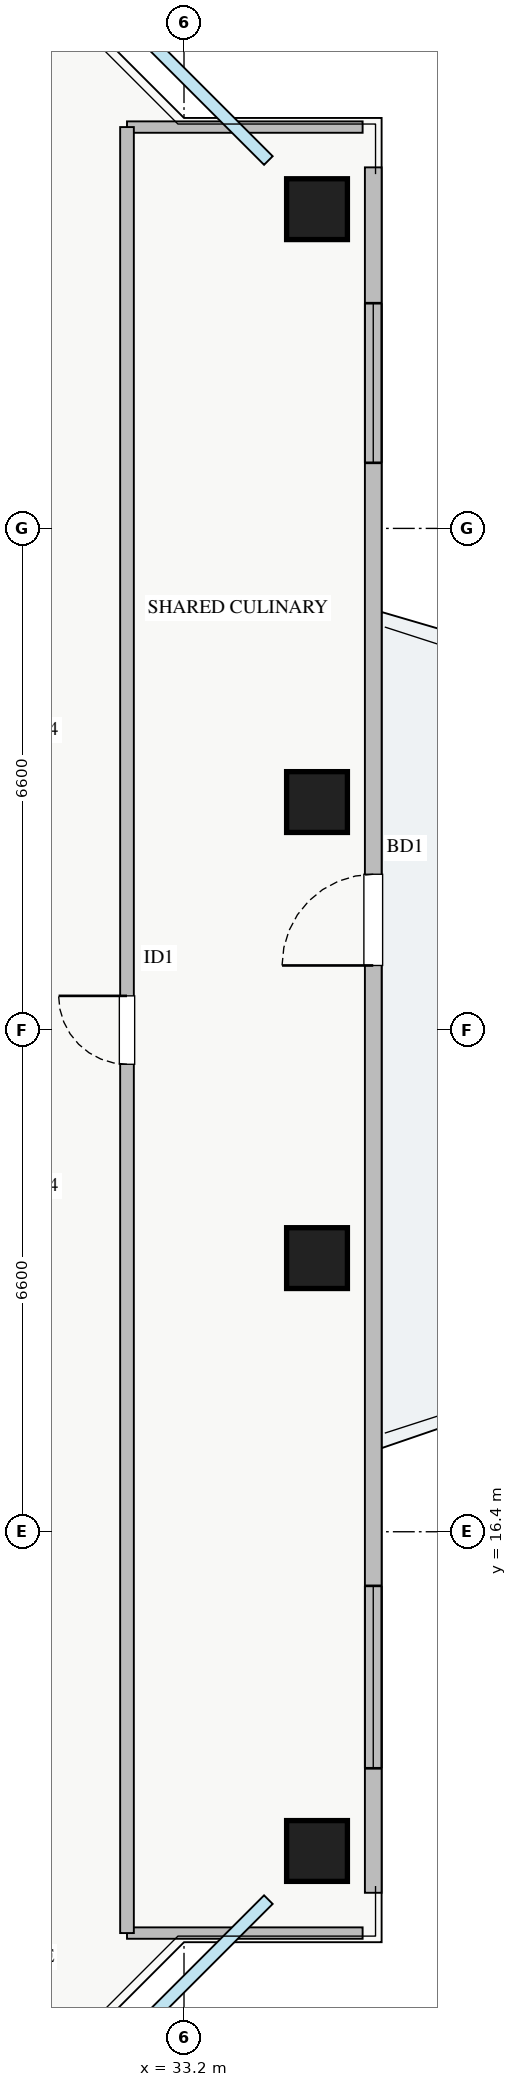
"""IFC4 building model, lengths in metres.
Left out: names, types, materials, properties, quantities, classifications, styles, units other than length and angle.
Written with IfcOpenShell. Run it as: python <this file> out.ifc"""

import sys

from ifc_helpers import new_model, si_unit, direction, frame, frame_2d, origin, origin_2d, place, context, subcontext, project, spatial, rectangle, extrude, source, transform, mapped, element, fill, save


model = new_model("IFC4")
c1 = context("Model", 3, precision=1e-05, world=origin(), true_north=direction((0.0, 1.0)))
c2 = subcontext(c1, "Body", "Model", "MODEL_VIEW")
j1 = project(units=[si_unit("LENGTHUNIT", "METRE"), si_unit("PLANEANGLEUNIT", "RADIAN")], contexts=[c1])
p1 = place(None, origin())
s1 = spatial("IfcSite", under=j1, at=p1, CompositionType="ELEMENT")
p2 = place(p1, origin())
s2 = spatial("IfcBuilding", under=s1, at=p2, CompositionType="ELEMENT")
p3 = place(p2, frame((0.0, 0.0, 229.5)))
s3 = spatial("IfcBuildingStorey", under=s2, at=p3, CompositionType="ELEMENT", Elevation=229.5)
m1 = source(origin(), c2, "Body", "SweptSolid", [
    extrude(rectangle(XDim=0.8, YDim=0.8, at=origin_2d()), origin(), (0.0, 0.0, 1.0), 3.25),
])
for number, where, z_axis, x_axis in (
    (1, (34.95, 12.2, 0.0), (0.0, 0.0, 1.0), (1.0, 0.0, 0.0)),
    (2, (34.95, 20.0, 0.0), (0.0, 0.0, 1.0), (1.0, 0.0, 0.0)),
    (3, (34.95, 26.0, 0.0), (0.0, 0.0, 1.0), (1.0, 0.0, 0.0)),
    (4, (34.95, 33.8, 0.0), (0.0, 0.0, 1.0), (1.0, 0.0, 0.0)),
):
    element("IfcColumn", number, at=place(p3, frame(where, z_axis=z_axis, x_axis=x_axis)), inside=s3, PredefinedType="COLUMN", context=c2, shape_type="MappedRepresentation", body=[
        mapped(m1, transform((0.0, 0.0, 0.0), x_axis=(1.0, 0.0, 0.0), y_axis=(0.0, 1.0, 0.0), z_axis=(0.0, 0.0, 1.0), scale=1.0)),
    ])
p4 = place(p3, frame((35.69, 11.65, 0.0), z_axis=(0.0, 0.0, 1.0), x_axis=(0.0, 1.0, 0.0)))
e5 = element("IfcWall", 5, at=p4, inside=s3, PredefinedType="STANDARD", context=c2, shape_type="SweptSolid", body=[
    extrude(rectangle(XDim=22.7, YDim=0.22, at=frame_2d((11.35, 0.0))), origin(), (0.0, 0.0, 1.0), 2.57),
])
p5 = place(p4, frame((12.2, 0.0, 0.0)))
e6 = element("IfcOpeningElement", 6, at=p5, cuts=e5, PredefinedType="OPENING", context=c2, shape_type="SweptSolid", body=[
    extrude(rectangle(XDim=1.2, YDim=2.1, at=frame_2d((0.6, 1.05))), frame((0.0, 0.12, 0.0), z_axis=(0.0, -1.0, 0.0), x_axis=(1.0, 0.0, 0.0)), (0.0, 0.0, 1.0), 0.24),
])
p6 = place(p4, frame((1.638, 0.0, 0.9)))
e7 = element("IfcOpeningElement", 7, at=p6, cuts=e5, PredefinedType="OPENING", context=c2, shape_type="SweptSolid", body=[
    extrude(rectangle(XDim=2.4, YDim=1.48, at=frame_2d((1.2, 0.74))), frame((0.0, 0.12, 0.0), z_axis=(0.0, -1.0, 0.0), x_axis=(1.0, 0.0, 0.0)), (0.0, 0.0, 1.0), 0.24),
])
p7 = place(p4, frame((18.813, 0.0, 0.9)))
e8 = element("IfcOpeningElement", 8, at=p7, cuts=e5, PredefinedType="OPENING", context=c2, shape_type="SweptSolid", body=[
    extrude(rectangle(XDim=2.1, YDim=1.48, at=frame_2d((1.05, 0.74))), frame((0.0, 0.12, 0.0), z_axis=(0.0, -1.0, 0.0), x_axis=(1.0, 0.0, 0.0)), (0.0, 0.0, 1.0), 0.24),
])
for number, where, z_axis, x_axis in (
    (9, (32.45, 34.88, 0.0), (0.0, 0.0, 1.0), (1.0, 0.0, 0.0)),
    (10, (32.45, 11.12, 0.0), (0.0, 0.0, 1.0), (1.0, 0.0, 0.0)),
):
    element("IfcWall", number, at=place(p3, frame(where, z_axis=z_axis, x_axis=x_axis)), inside=s3, PredefinedType="PARTITIONING", context=c2, shape_type="SweptSolid", body=[
        extrude(rectangle(XDim=3.1, YDim=0.15, at=frame_2d((1.55, 0.0))), origin(), (0.0, 0.0, 1.0), 3.03),
    ])
p8 = place(p3, frame((32.45, 11.12, 0.0), z_axis=(0.0, 0.0, 1.0), x_axis=(0.0, 1.0, 0.0)))
e11 = element("IfcWall", 11, at=p8, inside=s3, PredefinedType="PARTITIONING", context=c2, shape_type="SweptSolid", body=[
    extrude(rectangle(XDim=23.76, YDim=0.18, at=frame_2d((11.88, 0.0))), origin(), (0.0, 0.0, 1.0), 3.03),
])
p9 = place(p8, frame((11.43, 0.0, 0.0)))
e12 = element("IfcOpeningElement", 12, at=p9, cuts=e11, PredefinedType="OPENING", context=c2, shape_type="SweptSolid", body=[
    extrude(rectangle(XDim=0.9, YDim=2.05, at=frame_2d((0.45, 1.025))), frame((0.0, 0.1, 0.0), z_axis=(0.0, -1.0, 0.0), x_axis=(1.0, 0.0, 0.0)), (0.0, 0.0, 1.0), 0.2),
])
m2 = source(origin(), c2, "Body", "SweptSolid", [
    extrude(rectangle(XDim=1.2, YDim=2.1, at=frame_2d((0.6, 1.05))), frame((0.0, 0.025, 0.0), z_axis=(0.0, -1.0, 0.0), x_axis=(1.0, 0.0, 0.0)), (0.0, 0.0, 1.0), 0.05),
])
p10 = place(p5, origin())
e13 = element("IfcDoor", 13, at=p10, inside=s3, OperationType="SINGLE_SWING_LEFT", PredefinedType="DOOR", context=c2, shape_type="MappedRepresentation", body=[
    mapped(m2, transform((0.0, 0.0, 0.0), x_axis=(1.0, 0.0, 0.0), y_axis=(0.0, 1.0, 0.0), z_axis=(0.0, 0.0, 1.0), scale=1.0)),
])
fill(e6, e13)
m3 = source(origin(), c2, "Body", "SweptSolid", [
    extrude(rectangle(XDim=2.4, YDim=1.48, at=frame_2d((1.2, 0.74))), frame((0.0, 0.03, 0.0), z_axis=(0.0, -1.0, 0.0), x_axis=(1.0, 0.0, 0.0)), (0.0, 0.0, 1.0), 0.06),
])
p11 = place(p6, origin())
e14 = element("IfcWindow", 14, at=p11, inside=s3, PartitioningType="TRIPLE_PANEL_VERTICAL", PredefinedType="WINDOW", context=c2, shape_type="MappedRepresentation", body=[
    mapped(m3, transform((0.0, 0.0, 0.0), x_axis=(1.0, 0.0, 0.0), y_axis=(0.0, 1.0, 0.0), z_axis=(0.0, 0.0, 1.0), scale=1.0)),
])
fill(e7, e14)
m4 = source(origin(), c2, "Body", "SweptSolid", [
    extrude(rectangle(XDim=2.1, YDim=1.48, at=frame_2d((1.05, 0.74))), frame((0.0, 0.03, 0.0), z_axis=(0.0, -1.0, 0.0), x_axis=(1.0, 0.0, 0.0)), (0.0, 0.0, 1.0), 0.06),
])
p12 = place(p7, origin())
e15 = element("IfcWindow", 15, at=p12, inside=s3, PartitioningType="TRIPLE_PANEL_VERTICAL", PredefinedType="WINDOW", context=c2, shape_type="MappedRepresentation", body=[
    mapped(m4, transform((0.0, 0.0, 0.0), x_axis=(1.0, 0.0, 0.0), y_axis=(0.0, 1.0, 0.0), z_axis=(0.0, 0.0, 1.0), scale=1.0)),
])
fill(e8, e15)
m5 = source(origin(), c2, "Body", "SweptSolid", [
    extrude(rectangle(XDim=0.9, YDim=2.05, at=frame_2d((0.45, 1.025))), frame((0.0, 0.025, 0.0), z_axis=(0.0, -1.0, 0.0), x_axis=(1.0, 0.0, 0.0)), (0.0, 0.0, 1.0), 0.05),
])
p13 = place(p9, origin())
e16 = element("IfcDoor", 16, at=p13, inside=s3, OperationType="SINGLE_SWING_RIGHT", PredefinedType="DOOR", context=c2, shape_type="MappedRepresentation", body=[
    mapped(m5, transform((0.0, 0.0, 0.0), x_axis=(1.0, 0.0, 0.0), y_axis=(0.0, 1.0, 0.0), z_axis=(0.0, 0.0, 1.0), scale=1.0)),
])
fill(e12, e16)
save(model, sys.argv[1])
